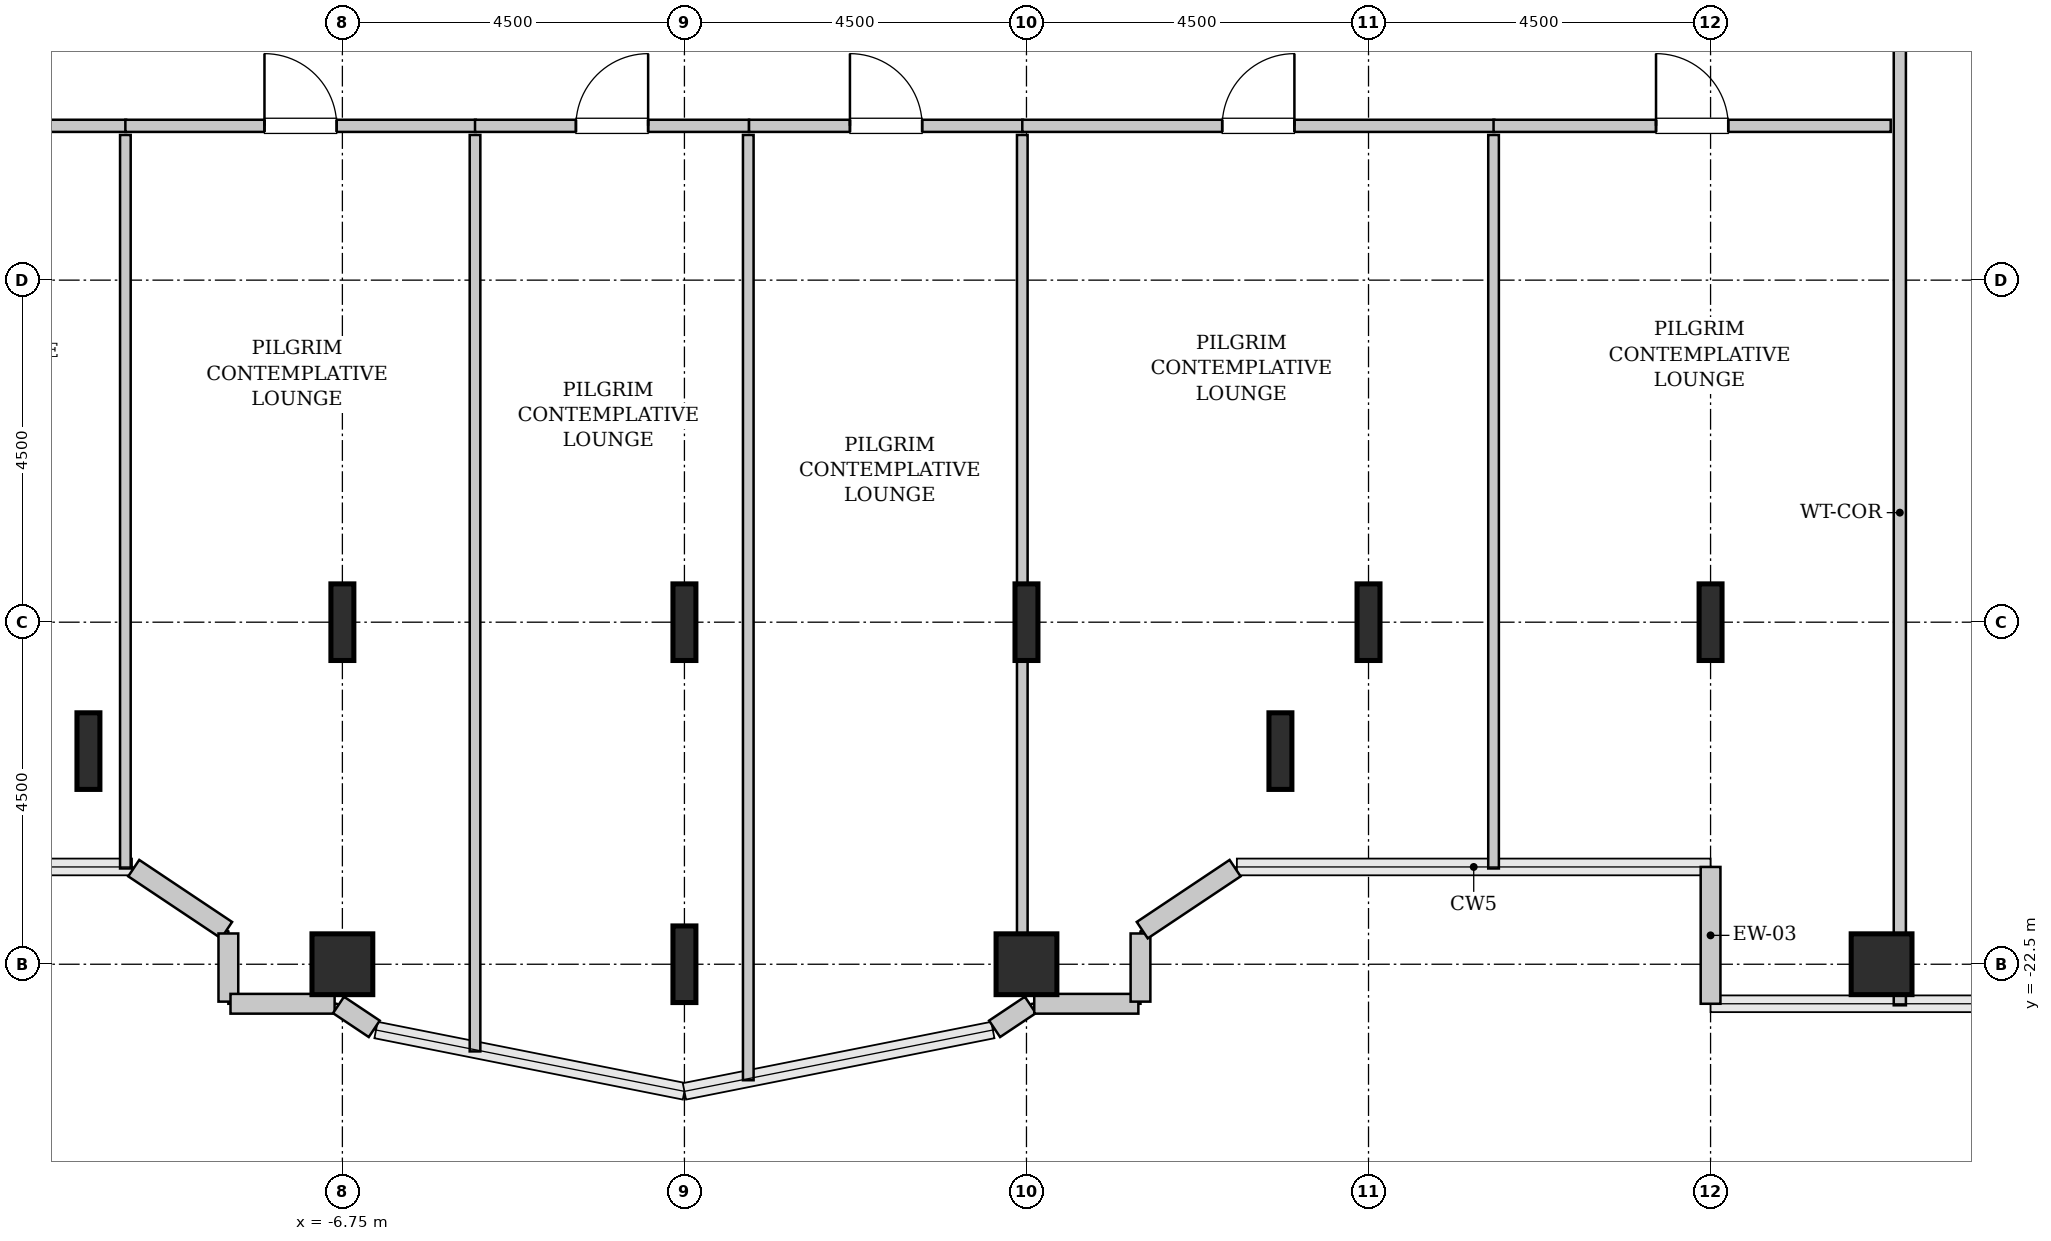
"""IFC4 building model, lengths in metres.
Left out: names, types, materials, properties, quantities, classifications, styles, units other than length and angle.
Written with IfcOpenShell. Run it as: python <this file> out.ifc"""

import sys

from ifc_helpers import new_model, si_unit, direction, frame, frame_2d, origin, origin_2d, place, context, subcontext, project, spatial, rectangle, hollow_rectangle, i_section, extrude, source, transform, mapped, element, fill, save


model = new_model("IFC4")
c1 = context("Model", 3, precision=1e-05, world=origin(), true_north=direction((0.0, 1.0)))
c2 = subcontext(c1, "Body", "Model", "MODEL_VIEW")
j1 = project(units=[si_unit("LENGTHUNIT", "METRE"), si_unit("PLANEANGLEUNIT", "RADIAN")], contexts=[c1])
p1 = place(None, origin())
s1 = spatial("IfcSite", under=j1, at=p1, CompositionType="ELEMENT")
p2 = place(p1, origin())
s2 = spatial("IfcBuilding", under=s1, at=p2, CompositionType="ELEMENT")
p3 = place(p2, frame((0.0, 0.0, 121.2)))
s3 = spatial("IfcBuildingStorey", under=s2, at=p3, CompositionType="ELEMENT", Elevation=121.2)
m1 = source(origin(), c2, "Body", "SweptSolid", [
    extrude(i_section(OverallWidth=0.302, OverallDepth=1.008, WebThickness=0.021, FlangeThickness=0.04, FilletRadius=0.03, at=origin_2d()), origin(), (0.0, 0.0, 1.0), 3.8),
])
p4 = place(p3, frame((-10.091, -19.696, 0.0), z_axis=(0.0, 0.0, 1.0), x_axis=(1.0, 0.0, 0.0)))
e1 = element("IfcColumn", 1, at=p4, inside=s3, PredefinedType="COLUMN", context=c2, shape_type="MappedRepresentation", body=[
    mapped(m1, transform((0.0, 0.0, 0.0), x_axis=(1.0, 0.0, 0.0), y_axis=(0.0, 1.0, 0.0), z_axis=(0.0, 0.0, 1.0), scale=1.0)),
])
m2 = source(origin(), c2, "Body", "SweptSolid", [
    extrude(hollow_rectangle(XDim=0.8, YDim=0.8, WallThickness=0.04, InnerFilletRadius=0.04, OuterFilletRadius=0.08, at=origin_2d()), origin(), (0.0, 0.0, 1.0), 3.8),
])
p5 = place(p3, frame((-6.75, -22.5, 0.0), z_axis=(0.0, 0.0, 1.0), x_axis=(1.0, 0.0, 0.0)))
e2 = element("IfcColumn", 2, at=p5, inside=s3, PredefinedType="COLUMN", context=c2, shape_type="MappedRepresentation", body=[
    mapped(m2, transform((0.0, 0.0, 0.0), x_axis=(1.0, 0.0, 0.0), y_axis=(0.0, 1.0, 0.0), z_axis=(0.0, 0.0, 1.0), scale=1.0)),
])
for number, where, z_axis, x_axis in (
    (3, (-6.75, -18.0, 0.0), (0.0, 0.0, 1.0), (1.0, 0.0, 0.0)),
    (4, (-2.25, -22.5, 0.0), (0.0, 0.0, 1.0), (1.0, 0.0, 0.0)),
    (5, (-2.25, -18.0, 0.0), (0.0, 0.0, 1.0), (1.0, 0.0, 0.0)),
):
    element("IfcColumn", number, at=place(p3, frame(where, z_axis=z_axis, x_axis=x_axis)), inside=s3, PredefinedType="COLUMN", context=c2, shape_type="MappedRepresentation", body=[
        mapped(m1, transform((0.0, 0.0, 0.0), x_axis=(1.0, 0.0, 0.0), y_axis=(0.0, 1.0, 0.0), z_axis=(0.0, 0.0, 1.0), scale=1.0)),
    ])
p6 = place(p3, frame((2.25, -22.5, 0.0), z_axis=(0.0, 0.0, 1.0), x_axis=(1.0, 0.0, 0.0)))
e6 = element("IfcColumn", 6, at=p6, inside=s3, PredefinedType="COLUMN", context=c2, shape_type="MappedRepresentation", body=[
    mapped(m2, transform((0.0, 0.0, 0.0), x_axis=(1.0, 0.0, 0.0), y_axis=(0.0, 1.0, 0.0), z_axis=(0.0, 0.0, 1.0), scale=1.0)),
])
for number, where, z_axis, x_axis in (
    (7, (2.25, -18.0, 0.0), (0.0, 0.0, 1.0), (1.0, 0.0, 0.0)),
    (8, (5.591, -19.696, 0.0), (0.0, 0.0, 1.0), (1.0, 0.0, 0.0)),
    (9, (6.75, -18.0, 0.0), (0.0, 0.0, 1.0), (1.0, 0.0, 0.0)),
    (10, (11.25, -18.0, 0.0), (0.0, 0.0, 1.0), (1.0, 0.0, 0.0)),
):
    element("IfcColumn", number, at=place(p3, frame(where, z_axis=z_axis, x_axis=x_axis)), inside=s3, PredefinedType="COLUMN", context=c2, shape_type="MappedRepresentation", body=[
        mapped(m1, transform((0.0, 0.0, 0.0), x_axis=(1.0, 0.0, 0.0), y_axis=(0.0, 1.0, 0.0), z_axis=(0.0, 0.0, 1.0), scale=1.0)),
    ])
p7 = place(p3, frame((13.5, -22.5, 0.0), z_axis=(0.0, 0.0, 1.0), x_axis=(1.0, 0.0, 0.0)))
e11 = element("IfcColumn", 11, at=p7, inside=s3, PredefinedType="COLUMN", context=c2, shape_type="MappedRepresentation", body=[
    mapped(m2, transform((0.0, 0.0, 0.0), x_axis=(1.0, 0.0, 0.0), y_axis=(0.0, 1.0, 0.0), z_axis=(0.0, 0.0, 1.0), scale=1.0)),
])
m3 = source(origin(), c2, "Body", "SweptSolid", [
    extrude(rectangle(XDim=1.8, YDim=0.26, at=frame_2d((0.9, 0.0))), origin(), (0.0, 0.0, 1.0), 3.55),
])
p8 = place(p3, frame((11.25, -21.22, 0.0), z_axis=(0.0, 0.0, 1.0), x_axis=(0.0, -1.0, 0.0)))
e12 = element("IfcWall", 12, at=p8, inside=s3, PredefinedType="SOLIDWALL", context=c2, shape_type="MappedRepresentation", body=[
    mapped(m3, transform((0.0, 0.0, 0.0), x_axis=(1.0, 0.0, 0.0), y_axis=(0.0, 1.0, 0.0), z_axis=(0.0, 0.0, 1.0), scale=1.0)),
])
m4 = source(origin(), c2, "Body", "SweptSolid", [
    extrude(rectangle(XDim=1.469, YDim=0.26, at=frame_2d((0.734, 0.0))), origin(), (0.0, 0.0, 1.0), 3.55),
])
p9 = place(p3, frame((-9.495, -21.236, 0.0), z_axis=(0.0, 0.0, 1.0), x_axis=(0.831461760506, -0.555581983884, 0.0)))
e13 = element("IfcWall", 13, at=p9, inside=s3, PredefinedType="SOLIDWALL", context=c2, shape_type="MappedRepresentation", body=[
    mapped(m4, transform((0.0, 0.0, 0.0), x_axis=(1.0, 0.0, 0.0), y_axis=(0.0, 1.0, 0.0), z_axis=(0.0, 0.0, 1.0), scale=1.0)),
])
m5 = source(origin(), c2, "Body", "SweptSolid", [
    extrude(rectangle(XDim=0.897, YDim=0.26, at=frame_2d((0.448, 0.0))), origin(), (0.0, 0.0, 1.0), 3.55),
])
p10 = place(p3, frame((-8.25, -22.095, 0.0), z_axis=(0.0, 0.0, 1.0), x_axis=(0.0, -1.0, 0.0)))
e14 = element("IfcWall", 14, at=p10, inside=s3, PredefinedType="SOLIDWALL", context=c2, shape_type="MappedRepresentation", body=[
    mapped(m5, transform((0.0, 0.0, 0.0), x_axis=(1.0, 0.0, 0.0), y_axis=(0.0, 1.0, 0.0), z_axis=(0.0, 0.0, 1.0), scale=1.0)),
])
m6 = source(origin(), c2, "Body", "SweptSolid", [
    extrude(rectangle(XDim=1.37, YDim=0.26, at=frame_2d((0.685, 0.0))), origin(), (0.0, 0.0, 1.0), 3.55),
])
p11 = place(p3, frame((-8.222, -23.02, 0.0), z_axis=(0.0, 0.0, 1.0), x_axis=(1.0, 0.0, 0.0)))
e15 = element("IfcWall", 15, at=p11, inside=s3, PredefinedType="SOLIDWALL", context=c2, shape_type="MappedRepresentation", body=[
    mapped(m6, transform((0.0, 0.0, 0.0), x_axis=(1.0, 0.0, 0.0), y_axis=(0.0, 1.0, 0.0), z_axis=(0.0, 0.0, 1.0), scale=1.0)),
])
m7 = source(origin(), c2, "Body", "SweptSolid", [
    extrude(rectangle(XDim=0.565, YDim=0.26, at=frame_2d((0.283, 0.0))), origin(), (0.0, 0.0, 1.0), 3.55),
])
for number, where, z_axis, x_axis in (
    (16, (-6.801, -23.036, 0.0), (0.0, 0.0, 1.0), (0.832, -0.555, 0.0)),
    (17, (1.831, -23.35, 0.0), (0.0, 0.0, 1.0), (0.832, 0.555, 0.0)),
):
    element("IfcWall", number, at=place(p3, frame(where, z_axis=z_axis, x_axis=x_axis)), inside=s3, PredefinedType="SOLIDWALL", context=c2, shape_type="MappedRepresentation", body=[
        mapped(m7, transform((0.0, 0.0, 0.0), x_axis=(1.0, 0.0, 0.0), y_axis=(0.0, 1.0, 0.0), z_axis=(0.0, 0.0, 1.0), scale=1.0)),
    ])
p12 = place(p3, frame((2.352, -23.02, 0.0), z_axis=(0.0, 0.0, 1.0), x_axis=(1.0, 0.0, 0.0)))
e18 = element("IfcWall", 18, at=p12, inside=s3, PredefinedType="SOLIDWALL", context=c2, shape_type="MappedRepresentation", body=[
    mapped(m6, transform((0.0, 0.0, 0.0), x_axis=(1.0, 0.0, 0.0), y_axis=(0.0, 1.0, 0.0), z_axis=(0.0, 0.0, 1.0), scale=1.0)),
])
p13 = place(p3, frame((3.75, -22.992, 0.0), z_axis=(0.0, 0.0, 1.0), x_axis=(0.0, 1.0, 0.0)))
e19 = element("IfcWall", 19, at=p13, inside=s3, PredefinedType="SOLIDWALL", context=c2, shape_type="MappedRepresentation", body=[
    mapped(m5, transform((0.0, 0.0, 0.0), x_axis=(1.0, 0.0, 0.0), y_axis=(0.0, 1.0, 0.0), z_axis=(0.0, 0.0, 1.0), scale=1.0)),
])
p14 = place(p3, frame((3.773, -22.052, 0.0), z_axis=(0.0, 0.0, 1.0), x_axis=(0.831461760506, 0.555581983884, 0.0)))
e20 = element("IfcWall", 20, at=p14, inside=s3, PredefinedType="SOLIDWALL", context=c2, shape_type="MappedRepresentation", body=[
    mapped(m4, transform((0.0, 0.0, 0.0), x_axis=(1.0, 0.0, 0.0), y_axis=(0.0, 1.0, 0.0), z_axis=(0.0, 0.0, 1.0), scale=1.0)),
])
m8 = source(origin(), c2, "Body", "SweptSolid", [
    extrude(rectangle(XDim=15.245, YDim=0.16, at=frame_2d((7.623, 0.0))), origin(), (0.0, 0.0, 1.0), 3.535),
])
p15 = place(p3, frame((13.74, -23.04, 0.0), z_axis=(0.0, 0.0, 1.0), x_axis=(0.0, 1.0, 0.0)))
e21 = element("IfcWall", 21, at=p15, inside=s3, PredefinedType="PARTITIONING", context=c2, shape_type="MappedRepresentation", body=[
    mapped(m8, transform((0.0, 0.0, 0.0), x_axis=(1.0, 0.0, 0.0), y_axis=(0.0, 1.0, 0.0), z_axis=(0.0, 0.0, 1.0), scale=1.0)),
])
p16 = place(p15, frame((12.913, 0.0, 0.0)))
e22 = element("IfcOpeningElement", 22, at=p16, cuts=e21, PredefinedType="OPENING", context=c2, shape_type="SweptSolid", body=[
    extrude(rectangle(XDim=0.95, YDim=2.1, at=frame_2d((0.475, 1.05))), frame((0.0, 0.09, 0.0), z_axis=(0.0, -1.0, 0.0), x_axis=(1.0, 0.0, 0.0)), (0.0, 0.0, 1.0), 0.18),
])
m9 = source(origin(), c2, "Body", "SweptSolid", [
    extrude(rectangle(XDim=4.025, YDim=0.16, at=frame_2d((2.013, 0.0))), origin(), (0.0, 0.0, 1.0), 3.535),
])
p17 = place(p3, frame((-13.62, -11.47, 0.0), z_axis=(0.0, 0.0, 1.0), x_axis=(1.0, 0.0, 0.0)))
e23 = element("IfcWall", 23, at=p17, inside=s3, PredefinedType="PARTITIONING", context=c2, shape_type="MappedRepresentation", body=[
    mapped(m9, transform((0.0, 0.0, 0.0), x_axis=(1.0, 0.0, 0.0), y_axis=(0.0, 1.0, 0.0), z_axis=(0.0, 0.0, 1.0), scale=1.0)),
])
p18 = place(p17, frame((1.538, 0.0, 0.0)))
e24 = element("IfcOpeningElement", 24, at=p18, cuts=e23, PredefinedType="OPENING", context=c2, shape_type="SweptSolid", body=[
    extrude(rectangle(XDim=0.95, YDim=2.1, at=frame_2d((0.475, 1.05))), frame((0.0, 0.09, 0.0), z_axis=(0.0, -1.0, 0.0), x_axis=(1.0, 0.0, 0.0)), (0.0, 0.0, 1.0), 0.18),
])
m10 = source(origin(), c2, "Body", "SweptSolid", [
    extrude(rectangle(XDim=9.65, YDim=0.14, at=frame_2d((4.825, 0.0))), origin(), (0.0, 0.0, 1.0), 3.535),
])
p19 = place(p3, frame((-9.605, -21.24, 0.0), z_axis=(0.0, 0.0, 1.0), x_axis=(0.0, 1.0, 0.0)))
e25 = element("IfcWall", 25, at=p19, inside=s3, PredefinedType="PARTITIONING", context=c2, shape_type="MappedRepresentation", body=[
    mapped(m10, transform((0.0, 0.0, 0.0), x_axis=(1.0, 0.0, 0.0), y_axis=(0.0, 1.0, 0.0), z_axis=(0.0, 0.0, 1.0), scale=1.0)),
])
m11 = source(origin(), c2, "Body", "SweptSolid", [
    extrude(rectangle(XDim=4.61, YDim=0.16, at=frame_2d((2.305, 0.0))), origin(), (0.0, 0.0, 1.0), 3.535),
])
p20 = place(p3, frame((-9.605, -11.47, 0.0), z_axis=(0.0, 0.0, 1.0), x_axis=(1.0, 0.0, 0.0)))
e26 = element("IfcWall", 26, at=p20, inside=s3, PredefinedType="PARTITIONING", context=c2, shape_type="MappedRepresentation", body=[
    mapped(m11, transform((0.0, 0.0, 0.0), x_axis=(1.0, 0.0, 0.0), y_axis=(0.0, 1.0, 0.0), z_axis=(0.0, 0.0, 1.0), scale=1.0)),
])
p21 = place(p20, frame((1.83, 0.0, 0.0)))
e27 = element("IfcOpeningElement", 27, at=p21, cuts=e26, PredefinedType="OPENING", context=c2, shape_type="SweptSolid", body=[
    extrude(rectangle(XDim=0.95, YDim=2.1, at=frame_2d((0.475, 1.05))), frame((0.0, 0.09, 0.0), z_axis=(0.0, -1.0, 0.0), x_axis=(1.0, 0.0, 0.0)), (0.0, 0.0, 1.0), 0.18),
])
m12 = source(origin(), c2, "Body", "SweptSolid", [
    extrude(rectangle(XDim=12.057, YDim=0.14, at=frame_2d((6.028, 0.0))), origin(), (0.0, 0.0, 1.0), 3.535),
])
p22 = place(p3, frame((-5.005, -23.647, 0.0), z_axis=(0.0, 0.0, 1.0), x_axis=(0.0, 1.0, 0.0)))
e28 = element("IfcWall", 28, at=p22, inside=s3, PredefinedType="PARTITIONING", context=c2, shape_type="MappedRepresentation", body=[
    mapped(m12, transform((0.0, 0.0, 0.0), x_axis=(1.0, 0.0, 0.0), y_axis=(0.0, 1.0, 0.0), z_axis=(0.0, 0.0, 1.0), scale=1.0)),
])
m13 = source(origin(), c2, "Body", "SweptSolid", [
    extrude(rectangle(XDim=3.605, YDim=0.16, at=frame_2d((1.802, 0.0))), origin(), (0.0, 0.0, 1.0), 3.535),
])
p23 = place(p3, frame((-5.005, -11.47, 0.0), z_axis=(0.0, 0.0, 1.0), x_axis=(1.0, 0.0, 0.0)))
e29 = element("IfcWall", 29, at=p23, inside=s3, PredefinedType="PARTITIONING", context=c2, shape_type="MappedRepresentation", body=[
    mapped(m13, transform((0.0, 0.0, 0.0), x_axis=(1.0, 0.0, 0.0), y_axis=(0.0, 1.0, 0.0), z_axis=(0.0, 0.0, 1.0), scale=1.0)),
])
p24 = place(p23, frame((1.327, 0.0, 0.0)))
e30 = element("IfcOpeningElement", 30, at=p24, cuts=e29, PredefinedType="OPENING", context=c2, shape_type="SweptSolid", body=[
    extrude(rectangle(XDim=0.95, YDim=2.1, at=frame_2d((0.475, 1.05))), frame((0.0, 0.09, 0.0), z_axis=(0.0, -1.0, 0.0), x_axis=(1.0, 0.0, 0.0)), (0.0, 0.0, 1.0), 0.18),
])
m14 = source(origin(), c2, "Body", "SweptSolid", [
    extrude(rectangle(XDim=12.436, YDim=0.14, at=frame_2d((6.218, 0.0))), origin(), (0.0, 0.0, 1.0), 3.535),
])
p25 = place(p3, frame((-1.41, -24.026, 0.0), z_axis=(0.0, 0.0, 1.0), x_axis=(0.0, 1.0, 0.0)))
e31 = element("IfcWall", 31, at=p25, inside=s3, PredefinedType="PARTITIONING", context=c2, shape_type="MappedRepresentation", body=[
    mapped(m14, transform((0.0, 0.0, 0.0), x_axis=(1.0, 0.0, 0.0), y_axis=(0.0, 1.0, 0.0), z_axis=(0.0, 0.0, 1.0), scale=1.0)),
])
p26 = place(p3, frame((-1.4, -11.47, 0.0), z_axis=(0.0, 0.0, 1.0), x_axis=(1.0, 0.0, 0.0)))
e32 = element("IfcWall", 32, at=p26, inside=s3, PredefinedType="PARTITIONING", context=c2, shape_type="MappedRepresentation", body=[
    mapped(m13, transform((0.0, 0.0, 0.0), x_axis=(1.0, 0.0, 0.0), y_axis=(0.0, 1.0, 0.0), z_axis=(0.0, 0.0, 1.0), scale=1.0)),
])
p27 = place(p26, frame((1.327, 0.0, 0.0)))
e33 = element("IfcOpeningElement", 33, at=p27, cuts=e32, PredefinedType="OPENING", context=c2, shape_type="SweptSolid", body=[
    extrude(rectangle(XDim=0.95, YDim=2.1, at=frame_2d((0.475, 1.05))), frame((0.0, 0.09, 0.0), z_axis=(0.0, -1.0, 0.0), x_axis=(1.0, 0.0, 0.0)), (0.0, 0.0, 1.0), 0.18),
])
m15 = source(origin(), c2, "Body", "SweptSolid", [
    extrude(rectangle(XDim=11.314, YDim=0.14, at=frame_2d((5.657, 0.0))), origin(), (0.0, 0.0, 1.0), 2.875),
])
p28 = place(p3, frame((2.195, -22.904, 0.0), z_axis=(0.0, 0.0, 1.0), x_axis=(0.0, 1.0, 0.0)))
e34 = element("IfcWall", 34, at=p28, inside=s3, PredefinedType="PARTITIONING", context=c2, shape_type="MappedRepresentation", body=[
    mapped(m15, transform((0.0, 0.0, 0.0), x_axis=(1.0, 0.0, 0.0), y_axis=(0.0, 1.0, 0.0), z_axis=(0.0, 0.0, 1.0), scale=1.0)),
])
m16 = source(origin(), c2, "Body", "SweptSolid", [
    extrude(rectangle(XDim=6.21, YDim=0.16, at=frame_2d((3.105, 0.0))), origin(), (0.0, 0.0, 1.0), 3.535),
])
p29 = place(p3, frame((2.195, -11.47, 0.0), z_axis=(0.0, 0.0, 1.0), x_axis=(1.0, 0.0, 0.0)))
e35 = element("IfcWall", 35, at=p29, inside=s3, PredefinedType="PARTITIONING", context=c2, shape_type="MappedRepresentation", body=[
    mapped(m16, transform((0.0, 0.0, 0.0), x_axis=(1.0, 0.0, 0.0), y_axis=(0.0, 1.0, 0.0), z_axis=(0.0, 0.0, 1.0), scale=1.0)),
])
p30 = place(p29, frame((2.63, 0.0, 0.0)))
e36 = element("IfcOpeningElement", 36, at=p30, cuts=e35, PredefinedType="OPENING", context=c2, shape_type="SweptSolid", body=[
    extrude(rectangle(XDim=0.95, YDim=2.1, at=frame_2d((0.475, 1.05))), frame((0.0, 0.09, 0.0), z_axis=(0.0, -1.0, 0.0), x_axis=(1.0, 0.0, 0.0)), (0.0, 0.0, 1.0), 0.18),
])
p31 = place(p3, frame((8.395, -21.24, 0.0), z_axis=(0.0, 0.0, 1.0), x_axis=(0.0, 1.0, 0.0)))
e37 = element("IfcWall", 37, at=p31, inside=s3, PredefinedType="PARTITIONING", context=c2, shape_type="MappedRepresentation", body=[
    mapped(m10, transform((0.0, 0.0, 0.0), x_axis=(1.0, 0.0, 0.0), y_axis=(0.0, 1.0, 0.0), z_axis=(0.0, 0.0, 1.0), scale=1.0)),
])
m17 = source(origin(), c2, "Body", "SweptSolid", [
    extrude(rectangle(XDim=5.225, YDim=0.16, at=frame_2d((2.613, 0.0))), origin(), (0.0, 0.0, 1.0), 3.535),
])
p32 = place(p3, frame((8.395, -11.47, 0.0), z_axis=(0.0, 0.0, 1.0), x_axis=(1.0, 0.0, 0.0)))
e38 = element("IfcWall", 38, at=p32, inside=s3, PredefinedType="PARTITIONING", context=c2, shape_type="MappedRepresentation", body=[
    mapped(m17, transform((0.0, 0.0, 0.0), x_axis=(1.0, 0.0, 0.0), y_axis=(0.0, 1.0, 0.0), z_axis=(0.0, 0.0, 1.0), scale=1.0)),
])
p33 = place(p32, frame((2.137, 0.0, 0.0)))
e39 = element("IfcOpeningElement", 39, at=p33, cuts=e38, PredefinedType="OPENING", context=c2, shape_type="SweptSolid", body=[
    extrude(rectangle(XDim=0.95, YDim=2.1, at=frame_2d((0.475, 1.05))), frame((0.0, 0.09, 0.0), z_axis=(0.0, -1.0, 0.0), x_axis=(1.0, 0.0, 0.0)), (0.0, 0.0, 1.0), 0.18),
])
m18 = source(origin(), c2, "Body", "SweptSolid", [
    extrude(rectangle(XDim=0.95, YDim=2.1, at=frame_2d((0.475, 1.05))), frame((0.0, 0.025, 0.0), z_axis=(0.0, -1.0, 0.0), x_axis=(1.0, 0.0, 0.0)), (0.0, 0.0, 1.0), 0.05),
])
p34 = place(p21, origin())
e40 = element("IfcDoor", 40, at=p34, inside=s3, OperationType="SINGLE_SWING_LEFT", PredefinedType="DOOR", context=c2, shape_type="MappedRepresentation", body=[
    mapped(m18, transform((0.0, 0.0, 0.0), x_axis=(1.0, 0.0, 0.0), y_axis=(0.0, 1.0, 0.0), z_axis=(0.0, 0.0, 1.0), scale=1.0)),
])
fill(e27, e40)
p35 = place(p24, origin())
e41 = element("IfcDoor", 41, at=p35, inside=s3, OperationType="SINGLE_SWING_RIGHT", PredefinedType="DOOR", context=c2, shape_type="MappedRepresentation", body=[
    mapped(m18, transform((0.0, 0.0, 0.0), x_axis=(1.0, 0.0, 0.0), y_axis=(0.0, 1.0, 0.0), z_axis=(0.0, 0.0, 1.0), scale=1.0)),
])
fill(e30, e41)
p36 = place(p27, origin())
e42 = element("IfcDoor", 42, at=p36, inside=s3, OperationType="SINGLE_SWING_LEFT", PredefinedType="DOOR", context=c2, shape_type="MappedRepresentation", body=[
    mapped(m18, transform((0.0, 0.0, 0.0), x_axis=(1.0, 0.0, 0.0), y_axis=(0.0, 1.0, 0.0), z_axis=(0.0, 0.0, 1.0), scale=1.0)),
])
fill(e33, e42)
p37 = place(p30, origin())
e43 = element("IfcDoor", 43, at=p37, inside=s3, OperationType="SINGLE_SWING_RIGHT", PredefinedType="DOOR", context=c2, shape_type="MappedRepresentation", body=[
    mapped(m18, transform((0.0, 0.0, 0.0), x_axis=(1.0, 0.0, 0.0), y_axis=(0.0, 1.0, 0.0), z_axis=(0.0, 0.0, 1.0), scale=1.0)),
])
fill(e36, e43)
p38 = place(p33, origin())
e44 = element("IfcDoor", 44, at=p38, inside=s3, OperationType="SINGLE_SWING_LEFT", PredefinedType="DOOR", context=c2, shape_type="MappedRepresentation", body=[
    mapped(m18, transform((0.0, 0.0, 0.0), x_axis=(1.0, 0.0, 0.0), y_axis=(0.0, 1.0, 0.0), z_axis=(0.0, 0.0, 1.0), scale=1.0)),
])
fill(e39, e44)
save(model, sys.argv[1])
